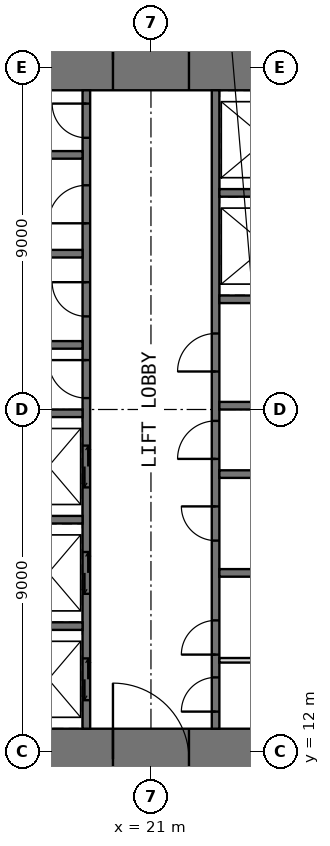
"""IFC4 building model, lengths in metres.
Left out: names, types, materials, properties, quantities, classifications, styles, units other than length and angle.
Written with IfcOpenShell. Run it as: python <this file> out.ifc"""

import sys

from ifc_helpers import new_model, si_unit, direction, frame, frame_2d, origin, place, context, subcontext, project, spatial, rectangle, extrude, element, fill, save


model = new_model("IFC4")
c1 = context("Model", 3, precision=1e-05, world=origin(), true_north=direction((0.0, 1.0)))
c2 = subcontext(c1, "Body", "Model", "MODEL_VIEW")
j1 = project(units=[si_unit("LENGTHUNIT", "METRE"), si_unit("PLANEANGLEUNIT", "RADIAN")], contexts=[c1])
p1 = place(None, origin())
s1 = spatial("IfcSite", under=j1, at=p1, CompositionType="ELEMENT")
p2 = place(p1, origin())
s2 = spatial("IfcBuilding", under=s1, at=p2, CompositionType="ELEMENT")
p3 = place(p2, frame((0.0, 0.0, 124.5)))
s3 = spatial("IfcBuildingStorey", under=s2, at=p3, CompositionType="ELEMENT", Elevation=124.5)
p4 = place(p3, frame((11.0, 11.8, -0.05), z_axis=(0.0, 0.0, 1.0), x_axis=(1.0, 0.0, 0.0)))
e1 = element("IfcWall", 1, at=p4, inside=s3, PredefinedType="SHEAR", context=c2, shape_type="SweptSolid", body=[
    extrude(rectangle(XDim=20.0, YDim=1.6, at=frame_2d((10.0, 0.0))), origin(), (0.0, 0.0, 1.0), 4.0),
])
p5 = place(p4, frame((9.0, 0.0, 0.05)))
e2 = element("IfcOpeningElement", 2, at=p5, cuts=e1, PredefinedType="OPENING", context=c2, shape_type="SweptSolid", body=[
    extrude(rectangle(XDim=2.0, YDim=2.2, at=frame_2d((1.0, 1.1))), frame((0.0, 0.81, 0.0), z_axis=(0.0, -1.0, 0.0), x_axis=(1.0, 0.0, 0.0)), (0.0, 0.0, 1.0), 1.62),
])
p6 = place(p3, frame((11.0, 30.2, -0.05), z_axis=(0.0, 0.0, 1.0), x_axis=(1.0, 0.0, 0.0)))
e3 = element("IfcWall", 3, at=p6, inside=s3, PredefinedType="SHEAR", context=c2, shape_type="SweptSolid", body=[
    extrude(rectangle(XDim=20.0, YDim=1.6, at=frame_2d((10.0, 0.0))), origin(), (0.0, 0.0, 1.0), 4.0),
])
p7 = place(p6, frame((9.0, 0.0, 0.05)))
e4 = element("IfcOpeningElement", 4, at=p7, cuts=e3, PredefinedType="OPENING", context=c2, shape_type="SweptSolid", body=[
    extrude(rectangle(XDim=2.0, YDim=2.2, at=frame_2d((1.0, 1.1))), frame((0.0, 0.81, 0.0), z_axis=(0.0, -1.0, 0.0), x_axis=(1.0, 0.0, 0.0)), (0.0, 0.0, 1.0), 1.62),
])
p8 = place(p3, frame((19.3, 12.6, -0.05), z_axis=(0.0, 0.0, 1.0), x_axis=(0.0, 1.0, 0.0)))
e5 = element("IfcWall", 5, at=p8, inside=s3, PredefinedType="SHEAR", context=c2, shape_type="SweptSolid", body=[
    extrude(rectangle(XDim=16.8, YDim=0.2, at=frame_2d((8.4, 0.0))), origin(), (0.0, 0.0, 1.0), 4.0),
])
p9 = place(p8, frame((8.7, 0.0, 0.05)))
e6 = element("IfcOpeningElement", 6, at=p9, cuts=e5, PredefinedType="OPENING", context=c2, shape_type="SweptSolid", body=[
    extrude(rectangle(XDim=1.0, YDim=2.2, at=frame_2d((0.5, 1.1))), frame((0.0, 0.11, 0.0), z_axis=(0.0, -1.0, 0.0), x_axis=(1.0, 0.0, 0.0)), (0.0, 0.0, 1.0), 0.22),
])
p10 = place(p8, frame((10.85, 0.0, 0.05)))
e7 = element("IfcOpeningElement", 7, at=p10, cuts=e5, PredefinedType="OPENING", context=c2, shape_type="SweptSolid", body=[
    extrude(rectangle(XDim=0.9, YDim=2.2, at=frame_2d((0.45, 1.1))), frame((0.0, 0.11, 0.0), z_axis=(0.0, -1.0, 0.0), x_axis=(1.0, 0.0, 0.0)), (0.0, 0.0, 1.0), 0.22),
])
p11 = place(p8, frame((13.3, 0.0, 0.05)))
e8 = element("IfcOpeningElement", 8, at=p11, cuts=e5, PredefinedType="OPENING", context=c2, shape_type="SweptSolid", body=[
    extrude(rectangle(XDim=1.0, YDim=2.2, at=frame_2d((0.5, 1.1))), frame((0.0, 0.11, 0.0), z_axis=(0.0, -1.0, 0.0), x_axis=(1.0, 0.0, 0.0)), (0.0, 0.0, 1.0), 0.22),
])
p12 = place(p8, frame((15.55, 0.0, 0.05)))
e9 = element("IfcOpeningElement", 9, at=p12, cuts=e5, PredefinedType="OPENING", context=c2, shape_type="SweptSolid", body=[
    extrude(rectangle(XDim=0.9, YDim=2.2, at=frame_2d((0.45, 1.1))), frame((0.0, 0.11, 0.0), z_axis=(0.0, -1.0, 0.0), x_axis=(1.0, 0.0, 0.0)), (0.0, 0.0, 1.0), 0.22),
])
p13 = place(p8, frame((0.75, 0.0, 0.05)))
e10 = element("IfcOpeningElement", 10, at=p13, cuts=e5, PredefinedType="OPENING", context=c2, shape_type="SweptSolid", body=[
    extrude(rectangle(XDim=1.1, YDim=2.2, at=frame_2d((0.55, 1.1))), frame((0.0, 0.11, 0.0), z_axis=(0.0, -1.0, 0.0), x_axis=(1.0, 0.0, 0.0)), (0.0, 0.0, 1.0), 0.22),
])
p14 = place(p8, frame((3.55, 0.0, 0.05)))
e11 = element("IfcOpeningElement", 11, at=p14, cuts=e5, PredefinedType="OPENING", context=c2, shape_type="SweptSolid", body=[
    extrude(rectangle(XDim=1.1, YDim=2.2, at=frame_2d((0.55, 1.1))), frame((0.0, 0.11, 0.0), z_axis=(0.0, -1.0, 0.0), x_axis=(1.0, 0.0, 0.0)), (0.0, 0.0, 1.0), 0.22),
])
p15 = place(p8, frame((6.35, 0.0, 0.05)))
e12 = element("IfcOpeningElement", 12, at=p15, cuts=e5, PredefinedType="OPENING", context=c2, shape_type="SweptSolid", body=[
    extrude(rectangle(XDim=1.1, YDim=2.2, at=frame_2d((0.55, 1.1))), frame((0.0, 0.11, 0.0), z_axis=(0.0, -1.0, 0.0), x_axis=(1.0, 0.0, 0.0)), (0.0, 0.0, 1.0), 0.22),
])
p16 = place(p3, frame((22.7, 12.6, -0.05), z_axis=(0.0, 0.0, 1.0), x_axis=(0.0, 1.0, 0.0)))
e13 = element("IfcWall", 13, at=p16, inside=s3, PredefinedType="SHEAR", context=c2, shape_type="SweptSolid", body=[
    extrude(rectangle(XDim=16.8, YDim=0.2, at=frame_2d((8.4, 0.0))), origin(), (0.0, 0.0, 1.0), 4.0),
])
p17 = place(p16, frame((0.45, 0.0, 0.05)))
e14 = element("IfcOpeningElement", 14, at=p17, cuts=e13, PredefinedType="OPENING", context=c2, shape_type="SweptSolid", body=[
    extrude(rectangle(XDim=0.9, YDim=2.2, at=frame_2d((0.45, 1.1))), frame((0.0, 0.11, 0.0), z_axis=(0.0, -1.0, 0.0), x_axis=(1.0, 0.0, 0.0)), (0.0, 0.0, 1.0), 0.22),
])
p18 = place(p16, frame((7.1, 0.0, 0.05)))
e15 = element("IfcOpeningElement", 15, at=p18, cuts=e13, PredefinedType="OPENING", context=c2, shape_type="SweptSolid", body=[
    extrude(rectangle(XDim=1.0, YDim=2.2, at=frame_2d((0.5, 1.1))), frame((0.0, 0.11, 0.0), z_axis=(0.0, -1.0, 0.0), x_axis=(1.0, 0.0, 0.0)), (0.0, 0.0, 1.0), 0.22),
])
p19 = place(p16, frame((1.95, 0.0, 0.05)))
e16 = element("IfcOpeningElement", 16, at=p19, cuts=e13, PredefinedType="OPENING", context=c2, shape_type="SweptSolid", body=[
    extrude(rectangle(XDim=0.9, YDim=2.2, at=frame_2d((0.45, 1.1))), frame((0.0, 0.11, 0.0), z_axis=(0.0, -1.0, 0.0), x_axis=(1.0, 0.0, 0.0)), (0.0, 0.0, 1.0), 0.22),
])
p20 = place(p16, frame((4.95, 0.0, 0.05)))
e17 = element("IfcOpeningElement", 17, at=p20, cuts=e13, PredefinedType="OPENING", context=c2, shape_type="SweptSolid", body=[
    extrude(rectangle(XDim=0.9, YDim=2.2, at=frame_2d((0.45, 1.1))), frame((0.0, 0.11, 0.0), z_axis=(0.0, -1.0, 0.0), x_axis=(1.0, 0.0, 0.0)), (0.0, 0.0, 1.0), 0.22),
])
p21 = place(p16, frame((9.4, 0.0, 0.05)))
e18 = element("IfcOpeningElement", 18, at=p21, cuts=e13, PredefinedType="OPENING", context=c2, shape_type="SweptSolid", body=[
    extrude(rectangle(XDim=1.0, YDim=2.2, at=frame_2d((0.5, 1.1))), frame((0.0, 0.11, 0.0), z_axis=(0.0, -1.0, 0.0), x_axis=(1.0, 0.0, 0.0)), (0.0, 0.0, 1.0), 0.22),
])
for number, where, z_axis, x_axis in (
    (19, (16.0, 15.3, -0.05), (0.0, 0.0, 1.0), (1.0, 0.0, 0.0)),
    (20, (16.0, 18.1, -0.05), (0.0, 0.0, 1.0), (1.0, 0.0, 0.0)),
    (21, (16.0, 20.9, -0.05), (0.0, 0.0, 1.0), (1.0, 0.0, 0.0)),
    (22, (16.0, 22.7, -0.05), (0.0, 0.0, 1.0), (1.0, 0.0, 0.0)),
    (23, (16.0, 25.1, -0.05), (0.0, 0.0, 1.0), (1.0, 0.0, 0.0)),
    (24, (16.0, 27.7, -0.05), (0.0, 0.0, 1.0), (1.0, 0.0, 0.0)),
    (25, (22.8, 16.7, -0.05), (0.0, 0.0, 1.0), (1.0, 0.0, 0.0)),
    (26, (22.8, 19.3, -0.05), (0.0, 0.0, 1.0), (1.0, 0.0, 0.0)),
    (27, (22.8, 21.1, -0.05), (0.0, 0.0, 1.0), (1.0, 0.0, 0.0)),
    (28, (22.8, 23.9, -0.05), (0.0, 0.0, 1.0), (1.0, 0.0, 0.0)),
    (29, (22.8, 26.7, -0.05), (0.0, 0.0, 1.0), (1.0, 0.0, 0.0)),
):
    element("IfcWall", number, at=place(p3, frame(where, z_axis=z_axis, x_axis=x_axis)), inside=s3, PredefinedType="SHEAR", context=c2, shape_type="SweptSolid", body=[
        extrude(rectangle(XDim=3.2, YDim=0.2, at=frame_2d((1.6, 0.0))), origin(), (0.0, 0.0, 1.0), 4.0),
    ])
p22 = place(p3, frame((22.8, 14.4, 0.0), z_axis=(0.0, 0.0, 1.0), x_axis=(1.0, 0.0, 0.0)))
e30 = element("IfcWall", 30, at=p22, inside=s3, PredefinedType="PARTITIONING", context=c2, shape_type="SweptSolid", body=[
    extrude(rectangle(XDim=3.2, YDim=0.12, at=frame_2d((1.6, 0.0))), origin(), (0.0, 0.0, 1.0), 3.75),
])
p23 = place(p5, origin())
e31 = element("IfcDoor", 31, at=p23, inside=s3, OperationType="DOUBLE_DOOR_SINGLE_SWING", PredefinedType="DOOR", context=c2, shape_type="SweptSolid", body=[
    extrude(rectangle(XDim=2.0, YDim=2.2, at=frame_2d((1.0, 1.1))), frame((0.0, 0.025, 0.0), z_axis=(0.0, -1.0, 0.0), x_axis=(1.0, 0.0, 0.0)), (0.0, 0.0, 1.0), 0.05),
])
fill(e2, e31)
p24 = place(p7, origin())
e32 = element("IfcDoor", 32, at=p24, inside=s3, OperationType="DOUBLE_DOOR_SINGLE_SWING", PredefinedType="DOOR", context=c2, shape_type="SweptSolid", body=[
    extrude(rectangle(XDim=2.0, YDim=2.2, at=frame_2d((1.0, 1.1))), frame((0.0, 0.025, 0.0), z_axis=(0.0, -1.0, 0.0), x_axis=(1.0, 0.0, 0.0)), (0.0, 0.0, 1.0), 0.05),
])
fill(e4, e32)
p25 = place(p17, origin())
e33 = element("IfcDoor", 33, at=p25, inside=s3, OperationType="SINGLE_SWING_LEFT", PredefinedType="DOOR", context=c2, shape_type="SweptSolid", body=[
    extrude(rectangle(XDim=0.9, YDim=2.2, at=frame_2d((0.45, 1.1))), frame((0.0, 0.025, 0.0), z_axis=(0.0, -1.0, 0.0), x_axis=(1.0, 0.0, 0.0)), (0.0, 0.0, 1.0), 0.05),
])
fill(e14, e33)
p26 = place(p9, origin())
e34 = element("IfcDoor", 34, at=p26, inside=s3, OperationType="SINGLE_SWING_RIGHT", PredefinedType="DOOR", context=c2, shape_type="SweptSolid", body=[
    extrude(rectangle(XDim=1.0, YDim=2.2, at=frame_2d((0.5, 1.1))), frame((0.0, 0.025, 0.0), z_axis=(0.0, -1.0, 0.0), x_axis=(1.0, 0.0, 0.0)), (0.0, 0.0, 1.0), 0.05),
])
fill(e6, e34)
p27 = place(p18, origin())
e35 = element("IfcDoor", 35, at=p27, inside=s3, OperationType="SINGLE_SWING_LEFT", PredefinedType="DOOR", context=c2, shape_type="SweptSolid", body=[
    extrude(rectangle(XDim=1.0, YDim=2.2, at=frame_2d((0.5, 1.1))), frame((0.0, 0.025, 0.0), z_axis=(0.0, -1.0, 0.0), x_axis=(1.0, 0.0, 0.0)), (0.0, 0.0, 1.0), 0.05),
])
fill(e15, e35)
p28 = place(p10, origin())
e36 = element("IfcDoor", 36, at=p28, inside=s3, OperationType="SINGLE_SWING_RIGHT", PredefinedType="DOOR", context=c2, shape_type="SweptSolid", body=[
    extrude(rectangle(XDim=0.9, YDim=2.2, at=frame_2d((0.45, 1.1))), frame((0.0, 0.025, 0.0), z_axis=(0.0, -1.0, 0.0), x_axis=(1.0, 0.0, 0.0)), (0.0, 0.0, 1.0), 0.05),
])
fill(e7, e36)
p29 = place(p11, origin())
e37 = element("IfcDoor", 37, at=p29, inside=s3, OperationType="SINGLE_SWING_LEFT", PredefinedType="DOOR", context=c2, shape_type="SweptSolid", body=[
    extrude(rectangle(XDim=1.0, YDim=2.2, at=frame_2d((0.5, 1.1))), frame((0.0, 0.025, 0.0), z_axis=(0.0, -1.0, 0.0), x_axis=(1.0, 0.0, 0.0)), (0.0, 0.0, 1.0), 0.05),
])
fill(e8, e37)
p30 = place(p12, origin())
e38 = element("IfcDoor", 38, at=p30, inside=s3, OperationType="SINGLE_SWING_RIGHT", PredefinedType="DOOR", context=c2, shape_type="SweptSolid", body=[
    extrude(rectangle(XDim=0.9, YDim=2.2, at=frame_2d((0.45, 1.1))), frame((0.0, 0.025, 0.0), z_axis=(0.0, -1.0, 0.0), x_axis=(1.0, 0.0, 0.0)), (0.0, 0.0, 1.0), 0.05),
])
fill(e9, e38)
p31 = place(p19, origin())
e39 = element("IfcDoor", 39, at=p31, inside=s3, OperationType="SINGLE_SWING_LEFT", PredefinedType="DOOR", context=c2, shape_type="SweptSolid", body=[
    extrude(rectangle(XDim=0.9, YDim=2.2, at=frame_2d((0.45, 1.1))), frame((0.0, 0.025, 0.0), z_axis=(0.0, -1.0, 0.0), x_axis=(1.0, 0.0, 0.0)), (0.0, 0.0, 1.0), 0.05),
])
fill(e16, e39)
p32 = place(p20, origin())
e40 = element("IfcDoor", 40, at=p32, inside=s3, OperationType="SINGLE_SWING_RIGHT", PredefinedType="DOOR", context=c2, shape_type="SweptSolid", body=[
    extrude(rectangle(XDim=0.9, YDim=2.2, at=frame_2d((0.45, 1.1))), frame((0.0, 0.025, 0.0), z_axis=(0.0, -1.0, 0.0), x_axis=(1.0, 0.0, 0.0)), (0.0, 0.0, 1.0), 0.05),
])
fill(e17, e40)
p33 = place(p21, origin())
e41 = element("IfcDoor", 41, at=p33, inside=s3, OperationType="SINGLE_SWING_LEFT", PredefinedType="DOOR", context=c2, shape_type="SweptSolid", body=[
    extrude(rectangle(XDim=1.0, YDim=2.2, at=frame_2d((0.5, 1.1))), frame((0.0, 0.025, 0.0), z_axis=(0.0, -1.0, 0.0), x_axis=(1.0, 0.0, 0.0)), (0.0, 0.0, 1.0), 0.05),
])
fill(e18, e41)
p34 = place(p13, origin())
e42 = element("IfcDoor", 42, at=p34, inside=s3, OperationType="DOUBLE_DOOR_SLIDING", PredefinedType="DOOR", context=c2, shape_type="SweptSolid", body=[
    extrude(rectangle(XDim=1.1, YDim=2.2, at=frame_2d((0.55, 1.1))), frame((0.0, 0.025, 0.0), z_axis=(0.0, -1.0, 0.0), x_axis=(1.0, 0.0, 0.0)), (0.0, 0.0, 1.0), 0.05),
])
fill(e10, e42)
p35 = place(p14, origin())
e43 = element("IfcDoor", 43, at=p35, inside=s3, OperationType="DOUBLE_DOOR_SLIDING", PredefinedType="DOOR", context=c2, shape_type="SweptSolid", body=[
    extrude(rectangle(XDim=1.1, YDim=2.2, at=frame_2d((0.55, 1.1))), frame((0.0, 0.025, 0.0), z_axis=(0.0, -1.0, 0.0), x_axis=(1.0, 0.0, 0.0)), (0.0, 0.0, 1.0), 0.05),
])
fill(e11, e43)
p36 = place(p15, origin())
e44 = element("IfcDoor", 44, at=p36, inside=s3, OperationType="DOUBLE_DOOR_SLIDING", PredefinedType="DOOR", context=c2, shape_type="SweptSolid", body=[
    extrude(rectangle(XDim=1.1, YDim=2.2, at=frame_2d((0.55, 1.1))), frame((0.0, 0.025, 0.0), z_axis=(0.0, -1.0, 0.0), x_axis=(1.0, 0.0, 0.0)), (0.0, 0.0, 1.0), 0.05),
])
fill(e12, e44)
save(model, sys.argv[1])
